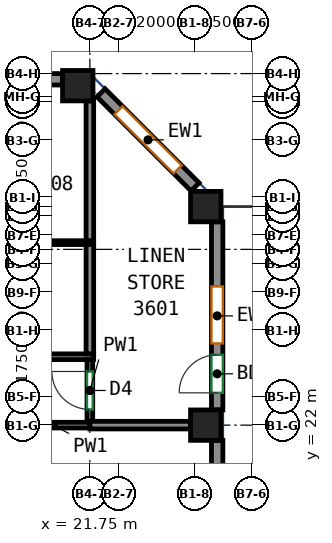
"""IFC4 building model, lengths in metres.
Left out: names, types, materials, properties, quantities, classifications, styles, units other than length and angle.
Written with IfcOpenShell. Run it as: python <this file> out.ifc"""

import sys

from ifc_helpers import new_model, si_unit, direction, frame, frame_2d, origin, origin_2d, place, context, subcontext, project, spatial, rectangle, extrude, source, transform, mapped, element, fill, save


model = new_model("IFC4")
c1 = context("Model", 3, precision=1e-05, world=origin(), true_north=direction((0.0, 1.0)))
c2 = subcontext(c1, "Body", "Model", "MODEL_VIEW")
j1 = project(units=[si_unit("LENGTHUNIT", "METRE"), si_unit("PLANEANGLEUNIT", "RADIAN")], contexts=[c1])
p1 = place(None, origin())
s1 = spatial("IfcSite", under=j1, at=p1, CompositionType="ELEMENT")
p2 = place(p1, origin())
s2 = spatial("IfcBuilding", under=s1, at=p2, CompositionType="ELEMENT")
p3 = place(p2, frame((0.0, 0.0, 157.5)))
s3 = spatial("IfcBuildingStorey", under=s2, at=p3, CompositionType="ELEMENT", Elevation=157.5)
m1 = source(origin(), c2, "Body", "SweptSolid", [
    extrude(rectangle(XDim=0.8, YDim=0.8, at=origin_2d()), origin(), (0.0, 0.0, 1.0), 3.12),
])
for number, where, z_axis, x_axis in (
    (1, (21.432, 30.932, 0.0), (0.0, 0.0, 1.0), (1.0, 0.0, 0.0)),
    (2, (24.8, 22.0, 0.0), (0.0, 0.0, 1.0), (1.0, 0.0, 0.0)),
    (3, (24.8, 27.75, 0.0), (0.0, 0.0, 1.0), (1.0, 0.0, 0.0)),
):
    element("IfcColumn", number, at=place(p3, frame(where, z_axis=z_axis, x_axis=x_axis)), inside=s3, PredefinedType="COLUMN", context=c2, shape_type="MappedRepresentation", body=[
        mapped(m1, transform((0.0, 0.0, 0.0))),
    ])
m2 = source(origin(), c2, "Body", "SweptSolid", [
    extrude(rectangle(XDim=13.2, YDim=0.3, at=frame_2d((6.6, 0.0))), origin(), (0.0, 0.0, 1.0), 3.12),
])
p4 = place(p3, frame((25.1, 8.4, 0.0), z_axis=(0.0, 0.0, 1.0), x_axis=(0.0, 1.0, 0.0)))
e4 = element("IfcWall", 4, at=p4, inside=s3, PredefinedType="SOLIDWALL", context=c2, shape_type="MappedRepresentation", body=[
    mapped(m2, transform((0.0, 0.0, 0.0))),
])
p5 = place(p4, frame((0.9, 0.0, 0.85)))
e5 = element("IfcOpeningElement", 5, at=p5, cuts=e4, PredefinedType="OPENING", context=c2, shape_type="SweptSolid", body=[
    extrude(rectangle(XDim=1.5, YDim=1.95, at=frame_2d((0.75, 0.975))), frame((0.0, 0.16, 0.0), z_axis=(0.0, -1.0, 0.0), x_axis=(1.0, 0.0, 0.0)), (0.0, 0.0, 1.0), 0.32),
])
p6 = place(p4, frame((4.2, 0.0, 0.85)))
e6 = element("IfcOpeningElement", 6, at=p6, cuts=e4, PredefinedType="OPENING", context=c2, shape_type="SweptSolid", body=[
    extrude(rectangle(XDim=1.5, YDim=1.95, at=frame_2d((0.75, 0.975))), frame((0.0, 0.16, 0.0), z_axis=(0.0, -1.0, 0.0), x_axis=(1.0, 0.0, 0.0)), (0.0, 0.0, 1.0), 0.32),
])
p7 = place(p4, frame((7.5, 0.0, 0.85)))
e7 = element("IfcOpeningElement", 7, at=p7, cuts=e4, PredefinedType="OPENING", context=c2, shape_type="SweptSolid", body=[
    extrude(rectangle(XDim=1.5, YDim=1.95, at=frame_2d((0.75, 0.975))), frame((0.0, 0.16, 0.0), z_axis=(0.0, -1.0, 0.0), x_axis=(1.0, 0.0, 0.0)), (0.0, 0.0, 1.0), 0.32),
])
p8 = place(p4, frame((10.8, 0.0, 0.85)))
e8 = element("IfcOpeningElement", 8, at=p8, cuts=e4, PredefinedType="OPENING", context=c2, shape_type="SweptSolid", body=[
    extrude(rectangle(XDim=1.5, YDim=1.95, at=frame_2d((0.75, 0.975))), frame((0.0, 0.16, 0.0), z_axis=(0.0, -1.0, 0.0), x_axis=(1.0, 0.0, 0.0)), (0.0, 0.0, 1.0), 0.32),
])
m3 = source(origin(), c2, "Body", "SweptSolid", [
    extrude(rectangle(XDim=4.95, YDim=0.3, at=frame_2d((2.475, 0.0))), origin(), (0.0, 0.0, 1.0), 3.12),
])
p9 = place(p3, frame((25.1, 22.4, 0.0), z_axis=(0.0, 0.0, 1.0), x_axis=(0.0, 1.0, 0.0)))
e9 = element("IfcWall", 9, at=p9, inside=s3, PredefinedType="SOLIDWALL", context=c2, shape_type="MappedRepresentation", body=[
    mapped(m3, transform((0.0, 0.0, 0.0))),
])
p10 = place(p9, frame((1.75, 0.0, 0.85)))
e10 = element("IfcOpeningElement", 10, at=p10, cuts=e9, PredefinedType="OPENING", context=c2, shape_type="SweptSolid", body=[
    extrude(rectangle(XDim=1.5, YDim=1.95, at=frame_2d((0.75, 0.975))), frame((0.0, 0.16, 0.0), z_axis=(0.0, -1.0, 0.0), x_axis=(1.0, 0.0, 0.0)), (0.0, 0.0, 1.0), 0.32),
])
p11 = place(p9, frame((0.45, 0.0, 0.0)))
e11 = element("IfcOpeningElement", 11, at=p11, cuts=e9, PredefinedType="OPENING", context=c2, shape_type="SweptSolid", body=[
    extrude(rectangle(XDim=1.0, YDim=2.1, at=frame_2d((0.5, 1.05))), frame((0.0, 0.16, 0.0), z_axis=(0.0, -1.0, 0.0), x_axis=(1.0, 0.0, 0.0)), (0.0, 0.0, 1.0), 0.32),
])
m4 = source(origin(), c2, "Body", "SweptSolid", [
    extrude(rectangle(XDim=3.5, YDim=0.3, at=frame_2d((1.75, 0.0))), origin(), (0.0, 0.0, 1.0), 3.12),
])
p12 = place(p3, frame((24.519, 28.269, 0.0), z_axis=(0.0, 0.0, 1.0), x_axis=(-0.70707190453, 0.707141656123, 0.0)))
e12 = element("IfcWall", 12, at=p12, inside=s3, PredefinedType="SOLIDWALL", context=c2, shape_type="MappedRepresentation", body=[
    mapped(m4, transform((0.0, 0.0, 0.0))),
])
p13 = place(p12, frame((0.65, 0.0, 0.85)))
e13 = element("IfcOpeningElement", 13, at=p13, cuts=e12, PredefinedType="OPENING", context=c2, shape_type="SweptSolid", body=[
    extrude(rectangle(XDim=2.2, YDim=1.95, at=frame_2d((1.1, 0.975))), frame((0.0, 0.16, 0.0), z_axis=(0.0, -1.0, 0.0), x_axis=(1.0, 0.0, 0.0)), (0.0, 0.0, 1.0), 0.32),
])
m5 = source(origin(), c2, "Body", "SweptSolid", [
    extrude(rectangle(XDim=6.465, YDim=0.3, at=frame_2d((3.232, 0.0))), origin(), (0.0, 0.0, 1.0), 3.12),
])
p14 = place(p3, frame((21.032, 31.1, 0.0), z_axis=(0.0, 0.0, 1.0), x_axis=(-1.0, 0.0, 0.0)))
e14 = element("IfcWall", 14, at=p14, inside=s3, PredefinedType="SOLIDWALL", context=c2, shape_type="MappedRepresentation", body=[
    mapped(m5, transform((0.0, 0.0, 0.0))),
])
p15 = place(p14, frame((0.516, 0.0, 0.85)))
e15 = element("IfcOpeningElement", 15, at=p15, cuts=e14, PredefinedType="OPENING", context=c2, shape_type="SweptSolid", body=[
    extrude(rectangle(XDim=2.2, YDim=1.95, at=frame_2d((1.1, 0.975))), frame((0.0, 0.16, 0.0), z_axis=(0.0, -1.0, 0.0), x_axis=(1.0, 0.0, 0.0)), (0.0, 0.0, 1.0), 0.32),
])
p16 = place(p14, frame((3.749, 0.0, 0.85)))
e16 = element("IfcOpeningElement", 16, at=p16, cuts=e14, PredefinedType="OPENING", context=c2, shape_type="SweptSolid", body=[
    extrude(rectangle(XDim=2.2, YDim=1.95, at=frame_2d((1.1, 0.975))), frame((0.0, 0.16, 0.0), z_axis=(0.0, -1.0, 0.0), x_axis=(1.0, 0.0, 0.0)), (0.0, 0.0, 1.0), 0.32),
])
p17 = place(p3, frame((-20.059, 23.8, 0.0), z_axis=(0.0, 0.0, 1.0), x_axis=(1.0, 0.0, 0.0)))
e17 = element("IfcWall", 17, at=p17, inside=s3, PredefinedType="PARTITIONING", context=c2, shape_type="SweptSolid", body=[
    extrude(rectangle(XDim=41.909, YDim=0.15, at=frame_2d((20.955, 0.0))), origin(), (0.0, 0.0, 1.0), 3.12),
])
p18 = place(p17, frame((5.293, 0.0, 0.0)))
e18 = element("IfcOpeningElement", 18, at=p18, cuts=e17, PredefinedType="OPENING", context=c2, shape_type="SweptSolid", body=[
    extrude(rectangle(XDim=1.0, YDim=2.1, at=frame_2d((0.5, 1.05))), frame((0.0, 0.085, 0.0), z_axis=(0.0, -1.0, 0.0), x_axis=(1.0, 0.0, 0.0)), (0.0, 0.0, 1.0), 0.17),
])
p19 = place(p17, frame((9.275, 0.0, 0.0)))
e19 = element("IfcOpeningElement", 19, at=p19, cuts=e17, PredefinedType="OPENING", context=c2, shape_type="SweptSolid", body=[
    extrude(rectangle(XDim=1.0, YDim=2.1, at=frame_2d((0.5, 1.05))), frame((0.0, 0.085, 0.0), z_axis=(0.0, -1.0, 0.0), x_axis=(1.0, 0.0, 0.0)), (0.0, 0.0, 1.0), 0.17),
])
p20 = place(p17, frame((18.292, 0.0, 0.0)))
e20 = element("IfcOpeningElement", 20, at=p20, cuts=e17, PredefinedType="OPENING", context=c2, shape_type="SweptSolid", body=[
    extrude(rectangle(XDim=1.0, YDim=2.1, at=frame_2d((0.5, 1.05))), frame((0.0, 0.085, 0.0), z_axis=(0.0, -1.0, 0.0), x_axis=(1.0, 0.0, 0.0)), (0.0, 0.0, 1.0), 0.17),
])
p21 = place(p17, frame((30.636, 0.0, 0.0)))
e21 = element("IfcOpeningElement", 21, at=p21, cuts=e17, PredefinedType="OPENING", context=c2, shape_type="SweptSolid", body=[
    extrude(rectangle(XDim=1.0, YDim=2.1, at=frame_2d((0.5, 1.05))), frame((0.0, 0.085, 0.0), z_axis=(0.0, -1.0, 0.0), x_axis=(1.0, 0.0, 0.0)), (0.0, 0.0, 1.0), 0.17),
])
p22 = place(p17, frame((36.828, 0.0, 0.0)))
e22 = element("IfcOpeningElement", 22, at=p22, cuts=e17, PredefinedType="OPENING", context=c2, shape_type="SweptSolid", body=[
    extrude(rectangle(XDim=1.0, YDim=2.1, at=frame_2d((0.5, 1.05))), frame((0.0, 0.085, 0.0), z_axis=(0.0, -1.0, 0.0), x_axis=(1.0, 0.0, 0.0)), (0.0, 0.0, 1.0), 0.17),
])
p23 = place(p17, frame((38.314, 0.0, 0.0)))
e23 = element("IfcOpeningElement", 23, at=p23, cuts=e17, PredefinedType="OPENING", context=c2, shape_type="SweptSolid", body=[
    extrude(rectangle(XDim=1.0, YDim=2.1, at=frame_2d((0.5, 1.05))), frame((0.0, 0.085, 0.0), z_axis=(0.0, -1.0, 0.0), x_axis=(1.0, 0.0, 0.0)), (0.0, 0.0, 1.0), 0.17),
])
p24 = place(p3, frame((21.75, 22.1, 0.0), z_axis=(0.0, 0.0, 1.0), x_axis=(0.0, 1.0, 0.0)))
e24 = element("IfcWall", 24, at=p24, inside=s3, PredefinedType="PARTITIONING", context=c2, shape_type="SweptSolid", body=[
    extrude(rectangle(XDim=1.625, YDim=0.15, at=frame_2d((0.812, 0.0))), origin(), (0.0, 0.0, 1.0), 3.12),
])
p25 = place(p24, frame((0.312, 0.0, 0.0)))
e25 = element("IfcOpeningElement", 25, at=p25, cuts=e24, PredefinedType="OPENING", context=c2, shape_type="SweptSolid", body=[
    extrude(rectangle(XDim=1.0, YDim=2.1, at=frame_2d((0.5, 1.05))), frame((0.0, 0.085, 0.0), z_axis=(0.0, -1.0, 0.0), x_axis=(1.0, 0.0, 0.0)), (0.0, 0.0, 1.0), 0.17),
])
p26 = place(p3, frame((19.825, 22.0, 0.0), z_axis=(0.0, 0.0, 1.0), x_axis=(1.0, 0.0, 0.0)))
e26 = element("IfcWall", 26, at=p26, inside=s3, PredefinedType="PARTITIONING", context=c2, shape_type="SweptSolid", body=[
    extrude(rectangle(XDim=1.925, YDim=0.15, at=frame_2d((0.962, 0.0))), origin(), (0.0, 0.0, 1.0), 3.12),
])
p27 = place(p3, frame((19.5, 26.802, 0.0), z_axis=(0.0, 0.0, 1.0), x_axis=(1.0, 0.0, 0.0)))
e27 = element("IfcWall", 27, at=p27, inside=s3, PredefinedType="PARTITIONING", context=c2, shape_type="SweptSolid", body=[
    extrude(rectangle(XDim=2.35, YDim=0.1, at=frame_2d((1.175, 0.0))), origin(), (0.0, 0.0, 1.0), 3.12),
])
p28 = place(p3, frame((21.75, 26.852, 0.0), z_axis=(0.0, 0.0, 1.0), x_axis=(0.0, 1.0, 0.0)))
e28 = element("IfcWall", 28, at=p28, inside=s3, PredefinedType="PARTITIONING", context=c2, shape_type="SweptSolid", body=[
    extrude(rectangle(XDim=3.68, YDim=0.2, at=frame_2d((1.84, 0.0))), origin(), (0.0, 0.0, 1.0), 3.12),
])
p29 = place(p3, frame((21.75, 23.877, 0.0), z_axis=(0.0, 0.0, 1.0), x_axis=(0.0, 1.0, 0.0)))
e29 = element("IfcWall", 29, at=p29, inside=s3, PredefinedType="PARTITIONING", context=c2, shape_type="SweptSolid", body=[
    extrude(rectangle(XDim=2.875, YDim=0.2, at=frame_2d((1.438, 0.0))), origin(), (0.0, 0.0, 1.0), 3.12),
])
p30 = place(p3, frame((21.752, 22.0, 0.0), z_axis=(0.0, 0.0, 1.0), x_axis=(1.0, 0.0, 0.0)))
e30 = element("IfcWall", 30, at=p30, inside=s3, PredefinedType="PARTITIONING", context=c2, shape_type="SweptSolid", body=[
    extrude(rectangle(XDim=2.648, YDim=0.2, at=frame_2d((1.324, 0.0))), origin(), (0.0, 0.0, 1.0), 3.12),
])
p31 = place(p10, origin())
e31 = element("IfcWindow", 31, at=p31, inside=s3, PartitioningType="SINGLE_PANEL", PredefinedType="WINDOW", context=c2, shape_type="SweptSolid", body=[
    extrude(rectangle(XDim=1.5, YDim=1.95, at=frame_2d((0.75, 0.975))), frame((0.0, 0.03, 0.0), z_axis=(0.0, -1.0, 0.0), x_axis=(1.0, 0.0, 0.0)), (0.0, 0.0, 1.0), 0.06),
])
fill(e10, e31)
p32 = place(p11, origin())
e32 = element("IfcDoor", 32, at=p32, inside=s3, OperationType="SINGLE_SWING_LEFT", PredefinedType="DOOR", context=c2, shape_type="SweptSolid", body=[
    extrude(rectangle(XDim=1.0, YDim=2.1, at=frame_2d((0.5, 1.05))), frame((0.0, 0.025, 0.0), z_axis=(0.0, -1.0, 0.0), x_axis=(1.0, 0.0, 0.0)), (0.0, 0.0, 1.0), 0.05),
])
fill(e11, e32)
p33 = place(p13, origin())
e33 = element("IfcWindow", 33, at=p33, inside=s3, PartitioningType="SINGLE_PANEL", PredefinedType="WINDOW", context=c2, shape_type="SweptSolid", body=[
    extrude(rectangle(XDim=2.2, YDim=1.95, at=frame_2d((1.1, 0.975))), frame((0.0, 0.03, 0.0), z_axis=(0.0, -1.0, 0.0), x_axis=(1.0, 0.0, 0.0)), (0.0, 0.0, 1.0), 0.06),
])
fill(e13, e33)
p34 = place(p25, origin())
e34 = element("IfcDoor", 34, at=p34, inside=s3, OperationType="SINGLE_SWING_RIGHT", PredefinedType="DOOR", context=c2, shape_type="SweptSolid", body=[
    extrude(rectangle(XDim=1.0, YDim=2.1, at=frame_2d((0.5, 1.05))), frame((0.0, 0.025, 0.0), z_axis=(0.0, -1.0, 0.0), x_axis=(1.0, 0.0, 0.0)), (0.0, 0.0, 1.0), 0.05),
])
fill(e25, e34)
save(model, sys.argv[1])
